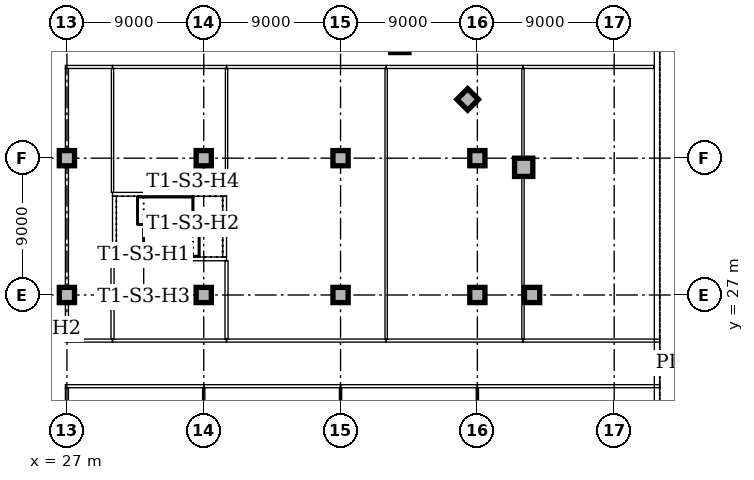
"""IFC4 building model, lengths in metres.
Left out: names, types, materials, properties, quantities, classifications, styles, units other than length and angle.
Written with IfcOpenShell. Run it as: python <this file> out.ifc"""

import sys

from ifc_helpers import new_model, si_unit, direction, frame, frame_2d, origin, origin_2d, place, context, subcontext, project, spatial, rectangle, extrude, element, fill, save


model = new_model("IFC4")
c1 = context("Model", 3, precision=1e-05, world=origin(), true_north=direction((0.0, 1.0)))
c2 = subcontext(c1, "Body", "Model", "MODEL_VIEW")
j1 = project(units=[si_unit("LENGTHUNIT", "METRE"), si_unit("PLANEANGLEUNIT", "RADIAN")], contexts=[c1])
p1 = place(None, origin())
s1 = spatial("IfcSite", under=j1, at=p1, CompositionType="ELEMENT")
p2 = place(p1, origin())
s2 = spatial("IfcBuilding", under=s1, at=p2, CompositionType="ELEMENT")
p3 = place(p2, origin())
s3 = spatial("IfcBuildingStorey", under=s2, at=p3, CompositionType="ELEMENT", Elevation=0.0)
for number, where, z_axis, x_axis in (
    (1, (30.0, 29.375, 0.0), (0.0, 0.0, 1.0), (1.0, 0.0, 0.0)),
    (2, (37.5, 33.625, 0.0), (0.0, 0.0, 1.0), (-1.0, 0.0, 0.0)),
):
    element("IfcWall", number, at=place(p3, frame(where, z_axis=z_axis, x_axis=x_axis)), inside=s3, PredefinedType="SOLIDWALL", context=c2, shape_type="SweptSolid", body=[
        extrude(rectangle(XDim=7.5, YDim=0.25, at=frame_2d((3.75, 0.0))), origin(), (0.0, 0.0, 1.0), 6.0),
    ])
for number, where, z_axis, x_axis in (
    (3, (37.375, 29.5, 0.0), (0.0, 0.0, 1.0), (0.0, 1.0, 0.0)),
    (4, (30.125, 33.5, 0.0), (0.0, 0.0, 1.0), (0.0, -1.0, 0.0)),
):
    element("IfcWall", number, at=place(p3, frame(where, z_axis=z_axis, x_axis=x_axis)), inside=s3, PredefinedType="SOLIDWALL", context=c2, shape_type="SweptSolid", body=[
        extrude(rectangle(XDim=4.0, YDim=0.25, at=frame_2d((2.0, 0.0))), origin(), (0.0, 0.0, 1.0), 6.0),
    ])
for number, where, z_axis, x_axis in (
    (5, (57.047, 35.398, 0.0), (0.0, 0.0, 1.0), (1.0, 0.0, 0.0)),
    (6, (48.898, 43.547, 0.0), (0.0, 0.0, 1.0), (1.0, 0.0, 0.0)),
):
    element("IfcColumn", number, at=place(p3, frame(where, z_axis=z_axis, x_axis=x_axis)), inside=s3, PredefinedType="COLUMN", context=c2, shape_type="SweptSolid", body=[
        extrude(rectangle(XDim=1.2, YDim=1.2, at=origin_2d()), origin(), (0.0, 0.0, 1.0), 5.7),
    ])
for number, where, z_axis, x_axis in (
    (7, (57.6, 27.0, 0.0), (0.0, 0.0, 1.0), (1.0, 0.0, 0.0)),
    (8, (53.364, 39.864, 0.0), (0.0, 0.0, 1.0), (0.707, 0.707, 0.0)),
    (9, (27.0, 27.0, 0.0), (0.0, 0.0, 1.0), (1.0, 0.0, 0.0)),
    (10, (27.0, 36.0, 0.0), (0.0, 0.0, 1.0), (1.0, 0.0, 0.0)),
    (11, (36.0, 27.0, 0.0), (0.0, 0.0, 1.0), (1.0, 0.0, 0.0)),
    (12, (36.0, 36.0, 0.0), (0.0, 0.0, 1.0), (1.0, 0.0, 0.0)),
    (13, (45.0, 27.0, 0.0), (0.0, 0.0, 1.0), (1.0, 0.0, 0.0)),
    (14, (45.0, 36.0, 0.0), (0.0, 0.0, 1.0), (1.0, 0.0, 0.0)),
    (15, (54.0, 27.0, 0.0), (0.0, 0.0, 1.0), (1.0, 0.0, 0.0)),
    (16, (54.0, 36.0, 0.0), (0.0, 0.0, 1.0), (1.0, 0.0, 0.0)),
):
    element("IfcColumn", number, at=place(p3, frame(where, z_axis=z_axis, x_axis=x_axis)), inside=s3, PredefinedType="COLUMN", context=c2, shape_type="SweptSolid", body=[
        extrude(rectangle(XDim=1.0, YDim=1.0, at=origin_2d()), origin(), (0.0, 0.0, 1.0), 5.7),
    ])
p4 = place(p3, frame((65.82, -9.0, 0.0), z_axis=(0.0, 0.0, 1.0), x_axis=(0.0, 1.0, 0.0)))
e17 = element("IfcWall", 17, at=p4, inside=s3, PredefinedType="STANDARD", context=c2, shape_type="SweptSolid", body=[
    extrude(rectangle(XDim=63.0, YDim=0.36, at=frame_2d((31.5, 0.0))), origin(), (0.0, 0.0, 1.0), 5.7),
])
p5 = place(p4, frame((30.6, 0.0, 0.0)))
e18 = element("IfcOpeningElement", 18, at=p5, cuts=e17, PredefinedType="OPENING", context=c2, shape_type="SweptSolid", body=[
    extrude(rectangle(XDim=1.8, YDim=2.2, at=frame_2d((0.9, 1.1))), frame((0.0, 0.19, 0.0), z_axis=(0.0, -1.0, 0.0), x_axis=(1.0, 0.0, 0.0)), (0.0, 0.0, 1.0), 0.38),
])
p6 = place(p4, frame((51.6, 0.0, 0.0)))
e19 = element("IfcOpeningElement", 19, at=p6, cuts=e17, PredefinedType="OPENING", context=c2, shape_type="SweptSolid", body=[
    extrude(rectangle(XDim=1.8, YDim=2.2, at=frame_2d((0.9, 1.1))), frame((0.0, 0.19, 0.0), z_axis=(0.0, -1.0, 0.0), x_axis=(1.0, 0.0, 0.0)), (0.0, 0.0, 1.0), 0.38),
])
p7 = place(p4, frame((9.6, 0.0, 0.0)))
e20 = element("IfcOpeningElement", 20, at=p7, cuts=e17, PredefinedType="OPENING", context=c2, shape_type="SweptSolid", body=[
    extrude(rectangle(XDim=2.4, YDim=2.2, at=frame_2d((1.2, 1.1))), frame((0.0, 0.19, 0.0), z_axis=(0.0, -1.0, 0.0), x_axis=(1.0, 0.0, 0.0)), (0.0, 0.0, 1.0), 0.38),
])
p8 = place(p4, frame((2.85, 0.0, 0.6)))
e21 = element("IfcOpeningElement", 21, at=p8, cuts=e17, PredefinedType="OPENING", context=c2, shape_type="SweptSolid", body=[
    extrude(rectangle(XDim=3.3, YDim=3.0, at=frame_2d((1.65, 1.5))), frame((0.0, 0.19, 0.0), z_axis=(0.0, -1.0, 0.0), x_axis=(1.0, 0.0, 0.0)), (0.0, 0.0, 1.0), 0.38),
])
p9 = place(p4, frame((16.35, 0.0, 0.6)))
e22 = element("IfcOpeningElement", 22, at=p9, cuts=e17, PredefinedType="OPENING", context=c2, shape_type="SweptSolid", body=[
    extrude(rectangle(XDim=3.3, YDim=3.0, at=frame_2d((1.65, 1.5))), frame((0.0, 0.19, 0.0), z_axis=(0.0, -1.0, 0.0), x_axis=(1.0, 0.0, 0.0)), (0.0, 0.0, 1.0), 0.38),
])
p10 = place(p4, frame((20.85, 0.0, 0.6)))
e23 = element("IfcOpeningElement", 23, at=p10, cuts=e17, PredefinedType="OPENING", context=c2, shape_type="SweptSolid", body=[
    extrude(rectangle(XDim=3.3, YDim=3.0, at=frame_2d((1.65, 1.5))), frame((0.0, 0.19, 0.0), z_axis=(0.0, -1.0, 0.0), x_axis=(1.0, 0.0, 0.0)), (0.0, 0.0, 1.0), 0.38),
])
p11 = place(p4, frame((25.35, 0.0, 0.6)))
e24 = element("IfcOpeningElement", 24, at=p11, cuts=e17, PredefinedType="OPENING", context=c2, shape_type="SweptSolid", body=[
    extrude(rectangle(XDim=3.3, YDim=3.0, at=frame_2d((1.65, 1.5))), frame((0.0, 0.19, 0.0), z_axis=(0.0, -1.0, 0.0), x_axis=(1.0, 0.0, 0.0)), (0.0, 0.0, 1.0), 0.38),
])
p12 = place(p4, frame((34.35, 0.0, 0.6)))
e25 = element("IfcOpeningElement", 25, at=p12, cuts=e17, PredefinedType="OPENING", context=c2, shape_type="SweptSolid", body=[
    extrude(rectangle(XDim=3.3, YDim=3.0, at=frame_2d((1.65, 1.5))), frame((0.0, 0.19, 0.0), z_axis=(0.0, -1.0, 0.0), x_axis=(1.0, 0.0, 0.0)), (0.0, 0.0, 1.0), 0.38),
])
p13 = place(p4, frame((38.85, 0.0, 0.6)))
e26 = element("IfcOpeningElement", 26, at=p13, cuts=e17, PredefinedType="OPENING", context=c2, shape_type="SweptSolid", body=[
    extrude(rectangle(XDim=3.3, YDim=3.0, at=frame_2d((1.65, 1.5))), frame((0.0, 0.19, 0.0), z_axis=(0.0, -1.0, 0.0), x_axis=(1.0, 0.0, 0.0)), (0.0, 0.0, 1.0), 0.38),
])
p14 = place(p4, frame((43.35, 0.0, 0.6)))
e27 = element("IfcOpeningElement", 27, at=p14, cuts=e17, PredefinedType="OPENING", context=c2, shape_type="SweptSolid", body=[
    extrude(rectangle(XDim=3.3, YDim=3.0, at=frame_2d((1.65, 1.5))), frame((0.0, 0.19, 0.0), z_axis=(0.0, -1.0, 0.0), x_axis=(1.0, 0.0, 0.0)), (0.0, 0.0, 1.0), 0.38),
])
p15 = place(p4, frame((47.85, 0.0, 0.6)))
e28 = element("IfcOpeningElement", 28, at=p15, cuts=e17, PredefinedType="OPENING", context=c2, shape_type="SweptSolid", body=[
    extrude(rectangle(XDim=3.3, YDim=3.0, at=frame_2d((1.65, 1.5))), frame((0.0, 0.19, 0.0), z_axis=(0.0, -1.0, 0.0), x_axis=(1.0, 0.0, 0.0)), (0.0, 0.0, 1.0), 0.38),
])
p16 = place(p4, frame((56.85, 0.0, 0.6)))
e29 = element("IfcOpeningElement", 29, at=p16, cuts=e17, PredefinedType="OPENING", context=c2, shape_type="SweptSolid", body=[
    extrude(rectangle(XDim=3.3, YDim=3.0, at=frame_2d((1.65, 1.5))), frame((0.0, 0.19, 0.0), z_axis=(0.0, -1.0, 0.0), x_axis=(1.0, 0.0, 0.0)), (0.0, 0.0, 1.0), 0.38),
])
p17 = place(p3, frame((26.9, 42.0, 0.0), z_axis=(0.0, 0.0, 1.0), x_axis=(1.0, 0.0, 0.0)))
e30 = element("IfcWall", 30, at=p17, inside=s3, PredefinedType="PARTITIONING", context=c2, shape_type="SweptSolid", body=[
    extrude(rectangle(XDim=3.1, YDim=0.2, at=frame_2d((1.55, 0.0))), origin(), (0.0, 0.0, 1.0), 5.7),
])
p18 = place(p3, frame((30.0, 42.0, 0.0), z_axis=(0.0, 0.0, 1.0), x_axis=(1.0, 0.0, 0.0)))
e31 = element("IfcWall", 31, at=p18, inside=s3, PredefinedType="PARTITIONING", context=c2, shape_type="SweptSolid", body=[
    extrude(rectangle(XDim=7.5, YDim=0.2, at=frame_2d((3.75, 0.0))), origin(), (0.0, 0.0, 1.0), 5.7),
])
p19 = place(p18, frame((3.25, 0.0, 0.0)))
e32 = element("IfcOpeningElement", 32, at=p19, cuts=e31, PredefinedType="OPENING", context=c2, shape_type="SweptSolid", body=[
    extrude(rectangle(XDim=1.0, YDim=2.1, at=frame_2d((0.5, 1.05))), frame((0.0, 0.11, 0.0), z_axis=(0.0, -1.0, 0.0), x_axis=(1.0, 0.0, 0.0)), (0.0, 0.0, 1.0), 0.22),
])
p20 = place(p3, frame((37.5, 42.0, 0.0), z_axis=(0.0, 0.0, 1.0), x_axis=(1.0, 0.0, 0.0)))
e33 = element("IfcWall", 33, at=p20, inside=s3, PredefinedType="PARTITIONING", context=c2, shape_type="SweptSolid", body=[
    extrude(rectangle(XDim=10.5, YDim=0.2, at=frame_2d((5.25, 0.0))), origin(), (0.0, 0.0, 1.0), 5.7),
])
p21 = place(p20, frame((4.75, 0.0, 0.0)))
e34 = element("IfcOpeningElement", 34, at=p21, cuts=e33, PredefinedType="OPENING", context=c2, shape_type="SweptSolid", body=[
    extrude(rectangle(XDim=1.0, YDim=2.1, at=frame_2d((0.5, 1.05))), frame((0.0, 0.11, 0.0), z_axis=(0.0, -1.0, 0.0), x_axis=(1.0, 0.0, 0.0)), (0.0, 0.0, 1.0), 0.22),
])
p22 = place(p3, frame((48.0, 42.0, 0.0), z_axis=(0.0, 0.0, 1.0), x_axis=(1.0, 0.0, 0.0)))
e35 = element("IfcWall", 35, at=p22, inside=s3, PredefinedType="PARTITIONING", context=c2, shape_type="SweptSolid", body=[
    extrude(rectangle(XDim=9.0, YDim=0.2, at=frame_2d((4.5, 0.0))), origin(), (0.0, 0.0, 1.0), 5.7),
])
p23 = place(p22, frame((4.0, 0.0, 0.0)))
e36 = element("IfcOpeningElement", 36, at=p23, cuts=e35, PredefinedType="OPENING", context=c2, shape_type="SweptSolid", body=[
    extrude(rectangle(XDim=1.0, YDim=2.1, at=frame_2d((0.5, 1.05))), frame((0.0, 0.11, 0.0), z_axis=(0.0, -1.0, 0.0), x_axis=(1.0, 0.0, 0.0)), (0.0, 0.0, 1.0), 0.22),
])
p24 = place(p3, frame((57.0, 42.0, 0.0), z_axis=(0.0, 0.0, 1.0), x_axis=(1.0, 0.0, 0.0)))
e37 = element("IfcWall", 37, at=p24, inside=s3, PredefinedType="PARTITIONING", context=c2, shape_type="SweptSolid", body=[
    extrude(rectangle(XDim=8.6, YDim=0.2, at=frame_2d((4.3, 0.0))), origin(), (0.0, 0.0, 1.0), 5.7),
])
p25 = place(p24, frame((4.0, 0.0, 0.0)))
e38 = element("IfcOpeningElement", 38, at=p25, cuts=e37, PredefinedType="OPENING", context=c2, shape_type="SweptSolid", body=[
    extrude(rectangle(XDim=1.0, YDim=2.1, at=frame_2d((0.5, 1.05))), frame((0.0, 0.11, 0.0), z_axis=(0.0, -1.0, 0.0), x_axis=(1.0, 0.0, 0.0)), (0.0, 0.0, 1.0), 0.22),
])
for number, where, z_axis, x_axis in (
    (39, (27.0, 18.52, 0.0), (0.0, 0.0, 1.0), (0.0, 1.0, 0.0)),
    (40, (27.0, 24.1, 0.0), (0.0, 0.0, 1.0), (0.0, 1.0, 0.0)),
):
    element("IfcWall", number, at=place(p3, frame(where, z_axis=z_axis, x_axis=x_axis)), inside=s3, PredefinedType="PARTITIONING", context=c2, shape_type="SweptSolid", body=[
        extrude(rectangle(XDim=2.38, YDim=0.2, at=frame_2d((1.19, 0.0))), origin(), (0.0, 0.0, 1.0), 5.7),
    ])
p26 = place(p3, frame((27.0, 27.52, 0.0), z_axis=(0.0, 0.0, 1.0), x_axis=(0.0, 1.0, 0.0)))
e41 = element("IfcWall", 41, at=p26, inside=s3, PredefinedType="PARTITIONING", context=c2, shape_type="SweptSolid", body=[
    extrude(rectangle(XDim=7.96, YDim=0.2, at=frame_2d((3.98, 0.0))), origin(), (0.0, 0.0, 1.0), 5.7),
])
p27 = place(p26, frame((4.98, 0.0, 0.0)))
e42 = element("IfcOpeningElement", 42, at=p27, cuts=e41, PredefinedType="OPENING", context=c2, shape_type="SweptSolid", body=[
    extrude(rectangle(XDim=1.0, YDim=2.1, at=frame_2d((0.5, 1.05))), frame((0.0, 0.11, 0.0), z_axis=(0.0, -1.0, 0.0), x_axis=(1.0, 0.0, 0.0)), (0.0, 0.0, 1.0), 0.22),
])
p28 = place(p3, frame((27.0, 36.52, 0.0), z_axis=(0.0, 0.0, 1.0), x_axis=(0.0, 1.0, 0.0)))
e43 = element("IfcWall", 43, at=p28, inside=s3, PredefinedType="PARTITIONING", context=c2, shape_type="SweptSolid", body=[
    extrude(rectangle(XDim=5.38, YDim=0.2, at=frame_2d((2.69, 0.0))), origin(), (0.0, 0.0, 1.0), 5.7),
])
p29 = place(p3, frame((26.9, 21.0, 0.0), z_axis=(0.0, 0.0, 1.0), x_axis=(1.0, 0.0, 0.0)))
e44 = element("IfcWall", 44, at=p29, inside=s3, PredefinedType="PARTITIONING", context=c2, shape_type="SweptSolid", body=[
    extrude(rectangle(XDim=9.1, YDim=0.2, at=frame_2d((4.55, 0.0))), origin(), (0.0, 0.0, 1.0), 5.7),
])
for number, where, z_axis, x_axis in (
    (45, (36.0, 21.0, 0.0), (0.0, 0.0, 1.0), (1.0, 0.0, 0.0)),
    (46, (45.0, 21.0, 0.0), (0.0, 0.0, 1.0), (1.0, 0.0, 0.0)),
):
    element("IfcWall", number, at=place(p3, frame(where, z_axis=z_axis, x_axis=x_axis)), inside=s3, PredefinedType="PARTITIONING", context=c2, shape_type="SweptSolid", body=[
        extrude(rectangle(XDim=9.0, YDim=0.2, at=frame_2d((4.5, 0.0))), origin(), (0.0, 0.0, 1.0), 5.7),
    ])
p30 = place(p3, frame((54.0, 21.0, 0.0), z_axis=(0.0, 0.0, 1.0), x_axis=(1.0, 0.0, 0.0)))
e47 = element("IfcWall", 47, at=p30, inside=s3, PredefinedType="PARTITIONING", context=c2, shape_type="SweptSolid", body=[
    extrude(rectangle(XDim=12.0, YDim=0.2, at=frame_2d((6.0, 0.0))), origin(), (0.0, 0.0, 1.0), 5.7),
])
p31 = place(p3, frame((26.9, 24.0, 0.0), z_axis=(0.0, 0.0, 1.0), x_axis=(1.0, 0.0, 0.0)))
e48 = element("IfcWall", 48, at=p31, inside=s3, PredefinedType="PARTITIONING", context=c2, shape_type="SweptSolid", body=[
    extrude(rectangle(XDim=3.1, YDim=0.2, at=frame_2d((1.55, 0.0))), origin(), (0.0, 0.0, 1.0), 5.7),
])
p32 = place(p3, frame((30.0, 24.0, 0.0), z_axis=(0.0, 0.0, 1.0), x_axis=(1.0, 0.0, 0.0)))
e49 = element("IfcWall", 49, at=p32, inside=s3, PredefinedType="PARTITIONING", context=c2, shape_type="SweptSolid", body=[
    extrude(rectangle(XDim=7.5, YDim=0.2, at=frame_2d((3.75, 0.0))), origin(), (0.0, 0.0, 1.0), 5.7),
])
p33 = place(p32, frame((3.25, 0.0, 0.0)))
e50 = element("IfcOpeningElement", 50, at=p33, cuts=e49, PredefinedType="OPENING", context=c2, shape_type="SweptSolid", body=[
    extrude(rectangle(XDim=1.0, YDim=2.1, at=frame_2d((0.5, 1.05))), frame((0.0, 0.11, 0.0), z_axis=(0.0, -1.0, 0.0), x_axis=(1.0, 0.0, 0.0)), (0.0, 0.0, 1.0), 0.22),
])
p34 = place(p3, frame((37.5, 24.0, 0.0), z_axis=(0.0, 0.0, 1.0), x_axis=(1.0, 0.0, 0.0)))
e51 = element("IfcWall", 51, at=p34, inside=s3, PredefinedType="PARTITIONING", context=c2, shape_type="SweptSolid", body=[
    extrude(rectangle(XDim=10.5, YDim=0.2, at=frame_2d((5.25, 0.0))), origin(), (0.0, 0.0, 1.0), 5.7),
])
for number, where, z_axis, x_axis in (
    (52, (48.0, 24.0, 0.0), (0.0, 0.0, 1.0), (1.0, 0.0, 0.0)),
    (53, (57.0, 24.0, 0.0), (0.0, 0.0, 1.0), (1.0, 0.0, 0.0)),
):
    element("IfcWall", number, at=place(p3, frame(where, z_axis=z_axis, x_axis=x_axis)), inside=s3, PredefinedType="PARTITIONING", context=c2, shape_type="SweptSolid", body=[
        extrude(rectangle(XDim=9.0, YDim=0.2, at=frame_2d((4.5, 0.0))), origin(), (0.0, 0.0, 1.0), 5.7),
    ])
for number, where, z_axis, x_axis in (
    (54, (36.0, 18.52, 0.0), (0.0, 0.0, 1.0), (0.0, 1.0, 0.0)),
    (55, (45.0, 18.52, 0.0), (0.0, 0.0, 1.0), (0.0, 1.0, 0.0)),
    (56, (54.0, 18.52, 0.0), (0.0, 0.0, 1.0), (0.0, 1.0, 0.0)),
):
    element("IfcWall", number, at=place(p3, frame(where, z_axis=z_axis, x_axis=x_axis)), inside=s3, PredefinedType="PARTITIONING", context=c2, shape_type="SweptSolid", body=[
        extrude(rectangle(XDim=2.38, YDim=0.15, at=frame_2d((1.19, 0.0))), origin(), (0.0, 0.0, 1.0), 5.7),
    ])
p35 = place(p3, frame((30.0, 24.1, 0.0), z_axis=(0.0, 0.0, 1.0), x_axis=(0.0, 1.0, 0.0)))
e57 = element("IfcWall", 57, at=p35, inside=s3, PredefinedType="PARTITIONING", context=c2, shape_type="SweptSolid", body=[
    extrude(rectangle(XDim=5.15, YDim=0.2, at=frame_2d((2.575, 0.0))), origin(), (0.0, 0.0, 1.0), 5.7),
])
p36 = place(p3, frame((30.0, 33.75, 0.0), z_axis=(0.0, 0.0, 1.0), x_axis=(0.0, 1.0, 0.0)))
e58 = element("IfcWall", 58, at=p36, inside=s3, PredefinedType="PARTITIONING", context=c2, shape_type="SweptSolid", body=[
    extrude(rectangle(XDim=8.15, YDim=0.15, at=frame_2d((4.075, 0.0))), origin(), (0.0, 0.0, 1.0), 5.7),
])
p37 = place(p3, frame((37.5, 24.1, 0.0), z_axis=(0.0, 0.0, 1.0), x_axis=(0.0, 1.0, 0.0)))
e59 = element("IfcWall", 59, at=p37, inside=s3, PredefinedType="PARTITIONING", context=c2, shape_type="SweptSolid", body=[
    extrude(rectangle(XDim=5.15, YDim=0.2, at=frame_2d((2.575, 0.0))), origin(), (0.0, 0.0, 1.0), 5.7),
])
p38 = place(p3, frame((37.5, 33.75, 0.0), z_axis=(0.0, 0.0, 1.0), x_axis=(0.0, 1.0, 0.0)))
e60 = element("IfcWall", 60, at=p38, inside=s3, PredefinedType="PARTITIONING", context=c2, shape_type="SweptSolid", body=[
    extrude(rectangle(XDim=8.15, YDim=0.15, at=frame_2d((4.075, 0.0))), origin(), (0.0, 0.0, 1.0), 5.7),
])
p39 = place(p3, frame((48.0, 24.1, 0.0), z_axis=(0.0, 0.0, 1.0), x_axis=(0.0, 1.0, 0.0)))
e61 = element("IfcWall", 61, at=p39, inside=s3, PredefinedType="PARTITIONING", context=c2, shape_type="SweptSolid", body=[
    extrude(rectangle(XDim=17.8, YDim=0.15, at=frame_2d((8.9, 0.0))), origin(), (0.0, 0.0, 1.0), 5.7),
])
p40 = place(p3, frame((57.0, 24.1, 0.0), z_axis=(0.0, 0.0, 1.0), x_axis=(0.0, 1.0, 0.0)))
e62 = element("IfcWall", 62, at=p40, inside=s3, PredefinedType="PARTITIONING", context=c2, shape_type="SweptSolid", body=[
    extrude(rectangle(XDim=10.678, YDim=0.15, at=frame_2d((5.339, 0.0))), origin(), (0.0, 0.0, 1.0), 5.7),
])
p41 = place(p3, frame((57.0, 36.018, 0.0), z_axis=(0.0, 0.0, 1.0), x_axis=(0.0, 1.0, 0.0)))
e63 = element("IfcWall", 63, at=p41, inside=s3, PredefinedType="PARTITIONING", context=c2, shape_type="SweptSolid", body=[
    extrude(rectangle(XDim=5.882, YDim=0.15, at=frame_2d((2.941, 0.0))), origin(), (0.0, 0.0, 1.0), 5.7),
])
p42 = place(p5, frame((1.8, 0.0, 0.0), z_axis=(0.0, 0.0, 1.0), x_axis=(-1.0, 0.0, 0.0)))
e64 = element("IfcDoor", 64, at=p42, inside=s3, OperationType="DOUBLE_DOOR_SINGLE_SWING", PredefinedType="DOOR", context=c2, shape_type="SweptSolid", body=[
    extrude(rectangle(XDim=1.8, YDim=2.2, at=frame_2d((0.9, 1.1))), frame((0.0, -0.07, 0.0), z_axis=(0.0, -1.0, 0.0), x_axis=(1.0, 0.0, 0.0)), (0.0, 0.0, 1.0), 0.05),
])
fill(e18, e64)
p43 = place(p6, frame((1.8, 0.0, 0.0), z_axis=(0.0, 0.0, 1.0), x_axis=(-1.0, 0.0, 0.0)))
e65 = element("IfcDoor", 65, at=p43, inside=s3, OperationType="DOUBLE_DOOR_SINGLE_SWING", PredefinedType="DOOR", context=c2, shape_type="SweptSolid", body=[
    extrude(rectangle(XDim=1.8, YDim=2.2, at=frame_2d((0.9, 1.1))), frame((0.0, -0.07, 0.0), z_axis=(0.0, -1.0, 0.0), x_axis=(1.0, 0.0, 0.0)), (0.0, 0.0, 1.0), 0.05),
])
fill(e19, e65)
p44 = place(p12, origin())
e66 = element("IfcWindow", 66, at=p44, inside=s3, PartitioningType="SINGLE_PANEL", PredefinedType="WINDOW", context=c2, shape_type="SweptSolid", body=[
    extrude(rectangle(XDim=3.3, YDim=3.0, at=frame_2d((1.65, 1.5))), frame((0.0, 0.13, 0.0), z_axis=(0.0, -1.0, 0.0), x_axis=(1.0, 0.0, 0.0)), (0.0, 0.0, 1.0), 0.06),
])
fill(e25, e66)
p45 = place(p13, origin())
e67 = element("IfcWindow", 67, at=p45, inside=s3, PartitioningType="SINGLE_PANEL", PredefinedType="WINDOW", context=c2, shape_type="SweptSolid", body=[
    extrude(rectangle(XDim=3.3, YDim=3.0, at=frame_2d((1.65, 1.5))), frame((0.0, 0.13, 0.0), z_axis=(0.0, -1.0, 0.0), x_axis=(1.0, 0.0, 0.0)), (0.0, 0.0, 1.0), 0.06),
])
fill(e26, e67)
p46 = place(p14, origin())
e68 = element("IfcWindow", 68, at=p46, inside=s3, PartitioningType="SINGLE_PANEL", PredefinedType="WINDOW", context=c2, shape_type="SweptSolid", body=[
    extrude(rectangle(XDim=3.3, YDim=3.0, at=frame_2d((1.65, 1.5))), frame((0.0, 0.13, 0.0), z_axis=(0.0, -1.0, 0.0), x_axis=(1.0, 0.0, 0.0)), (0.0, 0.0, 1.0), 0.06),
])
fill(e27, e68)
p47 = place(p15, origin())
e69 = element("IfcWindow", 69, at=p47, inside=s3, PartitioningType="SINGLE_PANEL", PredefinedType="WINDOW", context=c2, shape_type="SweptSolid", body=[
    extrude(rectangle(XDim=3.3, YDim=3.0, at=frame_2d((1.65, 1.5))), frame((0.0, 0.13, 0.0), z_axis=(0.0, -1.0, 0.0), x_axis=(1.0, 0.0, 0.0)), (0.0, 0.0, 1.0), 0.06),
])
fill(e28, e69)
p48 = place(p27, frame((1.0, 0.0, 0.0), z_axis=(0.0, 0.0, 1.0), x_axis=(-1.0, 0.0, 0.0)))
e70 = element("IfcDoor", 70, at=p48, inside=s3, OperationType="SINGLE_SWING_RIGHT", PredefinedType="DOOR", context=c2, shape_type="SweptSolid", body=[
    extrude(rectangle(XDim=1.0, YDim=2.1, at=frame_2d((0.5, 1.05))), frame((0.0, 0.025, 0.0), z_axis=(0.0, -1.0, 0.0), x_axis=(1.0, 0.0, 0.0)), (0.0, 0.0, 1.0), 0.05),
])
fill(e42, e70)
p49 = place(p33, origin())
e71 = element("IfcDoor", 71, at=p49, inside=s3, OperationType="SINGLE_SWING_RIGHT", PredefinedType="DOOR", context=c2, shape_type="SweptSolid", body=[
    extrude(rectangle(XDim=1.0, YDim=2.1, at=frame_2d((0.5, 1.05))), frame((0.0, 0.025, 0.0), z_axis=(0.0, -1.0, 0.0), x_axis=(1.0, 0.0, 0.0)), (0.0, 0.0, 1.0), 0.05),
])
fill(e50, e71)
p50 = place(p19, frame((1.0, 0.0, 0.0), z_axis=(0.0, 0.0, 1.0), x_axis=(-1.0, 0.0, 0.0)))
e72 = element("IfcDoor", 72, at=p50, inside=s3, OperationType="SINGLE_SWING_LEFT", PredefinedType="DOOR", context=c2, shape_type="SweptSolid", body=[
    extrude(rectangle(XDim=1.0, YDim=2.1, at=frame_2d((0.5, 1.05))), frame((0.0, 0.025, 0.0), z_axis=(0.0, -1.0, 0.0), x_axis=(1.0, 0.0, 0.0)), (0.0, 0.0, 1.0), 0.05),
])
fill(e32, e72)
p51 = place(p21, frame((1.0, 0.0, 0.0), z_axis=(0.0, 0.0, 1.0), x_axis=(-1.0, 0.0, 0.0)))
e73 = element("IfcDoor", 73, at=p51, inside=s3, OperationType="SINGLE_SWING_RIGHT", PredefinedType="DOOR", context=c2, shape_type="SweptSolid", body=[
    extrude(rectangle(XDim=1.0, YDim=2.1, at=frame_2d((0.5, 1.05))), frame((0.0, 0.025, 0.0), z_axis=(0.0, -1.0, 0.0), x_axis=(1.0, 0.0, 0.0)), (0.0, 0.0, 1.0), 0.05),
])
fill(e34, e73)
p52 = place(p23, frame((1.0, 0.0, 0.0), z_axis=(0.0, 0.0, 1.0), x_axis=(-1.0, 0.0, 0.0)))
e74 = element("IfcDoor", 74, at=p52, inside=s3, OperationType="SINGLE_SWING_RIGHT", PredefinedType="DOOR", context=c2, shape_type="SweptSolid", body=[
    extrude(rectangle(XDim=1.0, YDim=2.1, at=frame_2d((0.5, 1.05))), frame((0.0, 0.025, 0.0), z_axis=(0.0, -1.0, 0.0), x_axis=(1.0, 0.0, 0.0)), (0.0, 0.0, 1.0), 0.05),
])
fill(e36, e74)
p53 = place(p25, frame((1.0, 0.0, 0.0), z_axis=(0.0, 0.0, 1.0), x_axis=(-1.0, 0.0, 0.0)))
e75 = element("IfcDoor", 75, at=p53, inside=s3, OperationType="SINGLE_SWING_LEFT", PredefinedType="DOOR", context=c2, shape_type="SweptSolid", body=[
    extrude(rectangle(XDim=1.0, YDim=2.1, at=frame_2d((0.5, 1.05))), frame((0.0, 0.025, 0.0), z_axis=(0.0, -1.0, 0.0), x_axis=(1.0, 0.0, 0.0)), (0.0, 0.0, 1.0), 0.05),
])
fill(e38, e75)
save(model, sys.argv[1])
